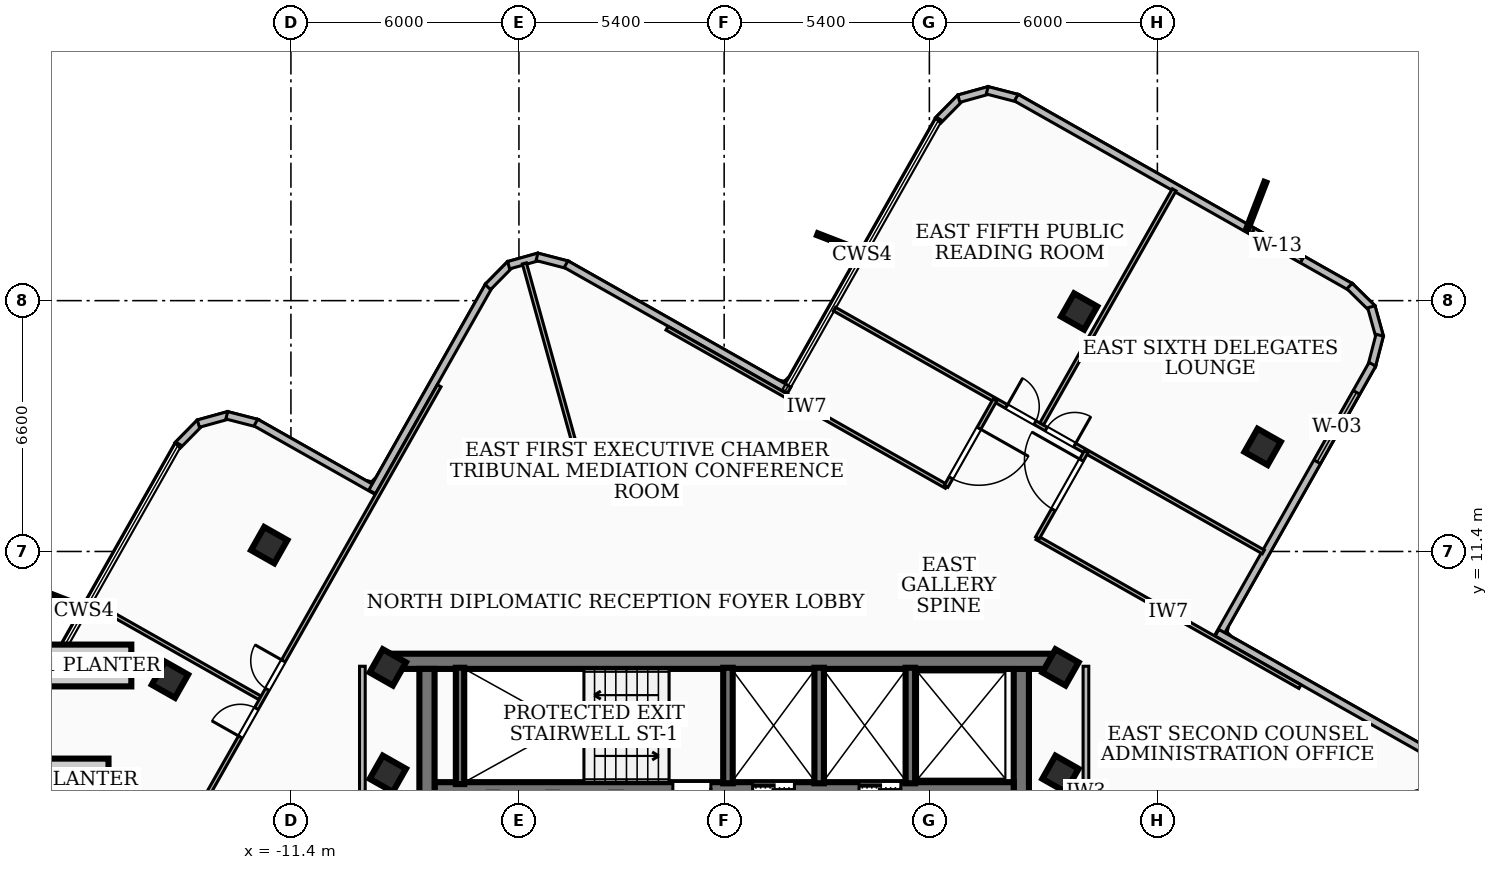
"""IFC4 building model, lengths in metres.
Left out: names, types, materials, properties, quantities, classifications, styles, units other than length and angle.
Written with IfcOpenShell. Run it as: python <this file> out.ifc"""

import sys

from ifc_helpers import new_model, si_unit, direction, frame, frame_2d, origin, origin_2d, place, context, subcontext, project, spatial, rectangle, extrude, element, fill, save


model = new_model("IFC4")
c1 = context("Model", 3, precision=1e-05, world=origin(), true_north=direction((0.0, 1.0)))
c2 = subcontext(c1, "Body", "Model", "MODEL_VIEW")
j1 = project(units=[si_unit("LENGTHUNIT", "METRE"), si_unit("PLANEANGLEUNIT", "RADIAN")], contexts=[c1])
p1 = place(None, origin())
s1 = spatial("IfcSite", under=j1, at=p1, CompositionType="ELEMENT")
p2 = place(p1, origin())
s2 = spatial("IfcBuilding", under=s1, at=p2, CompositionType="ELEMENT")
p3 = place(p2, frame((0.0, 0.0, 281.7)))
s3 = spatial("IfcBuildingStorey", under=s2, at=p3, CompositionType="ELEMENT", Elevation=281.7)
p4 = place(p3, frame((-8.78, 8.51, 0.0), z_axis=(0.0, 0.0, 1.0), x_axis=(1.0, 0.0, 0.0)))
e1 = element("IfcWall", 1, at=p4, inside=s3, PredefinedType="SHEAR", context=c2, shape_type="SweptSolid", body=[
    extrude(rectangle(XDim=17.56, YDim=0.4, at=frame_2d((8.78, 0.0))), origin(), (0.0, 0.0, 1.0), 3.12),
])
for number, where, z_axis, x_axis in (
    (2, (-7.82, 1.95, 0.0), (0.0, 0.0, 1.0), (0.0, 1.0, 0.0)),
    (3, (7.82, 8.31, 0.0), (0.0, 0.0, 1.0), (0.0, -1.0, 0.0)),
):
    element("IfcWall", number, at=place(p3, frame(where, z_axis=z_axis, x_axis=x_axis)), inside=s3, PredefinedType="SHEAR", context=c2, shape_type="SweptSolid", body=[
        extrude(rectangle(XDim=6.36, YDim=0.4, at=frame_2d((3.18, 0.0))), origin(), (0.0, 0.0, 1.0), 3.12),
    ])
p5 = place(p3, frame((7.62, 5.18, 0.0), z_axis=(0.0, 0.0, 1.0), x_axis=(-1.0, 0.0, 0.0)))
e4 = element("IfcWall", 4, at=p5, inside=s3, PredefinedType="SOLIDWALL", context=c2, shape_type="SweptSolid", body=[
    extrude(rectangle(XDim=15.24, YDim=0.3, at=frame_2d((7.62, 0.0))), origin(), (0.0, 0.0, 1.0), 3.12),
])
p6 = place(p5, frame((5.77, 0.0, 0.0)))
e5 = element("IfcOpeningElement", 5, at=p6, cuts=e4, PredefinedType="OPENING", context=c2, shape_type="SweptSolid", body=[
    extrude(rectangle(XDim=1.1, YDim=2.15, at=frame_2d((0.55, 1.075))), frame((0.0, 0.16, 0.0), z_axis=(0.0, -1.0, 0.0), x_axis=(1.0, 0.0, 0.0)), (0.0, 0.0, 1.0), 0.32),
])
p7 = place(p5, frame((2.97, 0.0, 0.0)))
e6 = element("IfcOpeningElement", 6, at=p7, cuts=e4, PredefinedType="OPENING", context=c2, shape_type="SweptSolid", body=[
    extrude(rectangle(XDim=1.1, YDim=2.15, at=frame_2d((0.55, 1.075))), frame((0.0, 0.16, 0.0), z_axis=(0.0, -1.0, 0.0), x_axis=(1.0, 0.0, 0.0)), (0.0, 0.0, 1.0), 0.32),
])
p8 = place(p5, frame((7.97, 0.0, 0.0)))
e7 = element("IfcOpeningElement", 7, at=p8, cuts=e4, PredefinedType="OPENING", context=c2, shape_type="SweptSolid", body=[
    extrude(rectangle(XDim=1.0, YDim=2.1, at=frame_2d((0.5, 1.05))), frame((0.0, 0.16, 0.0), z_axis=(0.0, -1.0, 0.0), x_axis=(1.0, 0.0, 0.0)), (0.0, 0.0, 1.0), 0.32),
])
p9 = place(p3, frame((-6.95, 5.28, 0.0), z_axis=(0.0, 0.0, 1.0), x_axis=(0.0, 1.0, 0.0)))
e8 = element("IfcWall", 8, at=p9, inside=s3, PredefinedType="SOLIDWALL", context=c2, shape_type="SweptSolid", body=[
    extrude(rectangle(XDim=3.06, YDim=0.22, at=frame_2d((1.53, 0.0))), origin(), (0.0, 0.0, 1.0), 3.12),
])
for number, where, z_axis, x_axis in (
    (9, (0.1, 5.3, 0.0), (0.0, 0.0, 1.0), (0.0, 1.0, 0.0)),
    (10, (2.5, 5.3, 0.0), (0.0, 0.0, 1.0), (0.0, 1.0, 0.0)),
    (11, (4.9, 5.3, 0.0), (0.0, 0.0, 1.0), (0.0, 1.0, 0.0)),
):
    element("IfcWall", number, at=place(p3, frame(where, z_axis=z_axis, x_axis=x_axis)), inside=s3, PredefinedType="SOLIDWALL", context=c2, shape_type="SweptSolid", body=[
        extrude(rectangle(XDim=3.04, YDim=0.25, at=frame_2d((1.52, 0.0))), origin(), (0.0, 0.0, 1.0), 3.12),
    ])
for number, where, z_axis, x_axis in (
    (12, (-8.85, 5.55, 0.0), (0.0, 0.0, 1.0), (0.493, 0.87, 0.0)),
    (13, (8.85, 5.55, 0.0), (0.0, 0.0, 1.0), (0.493, 0.87, 0.0)),
    (14, (-8.85, 8.35, 0.0), (0.0, 0.0, 1.0), (0.493, 0.87, 0.0)),
    (15, (8.85, 8.35, 0.0), (0.0, 0.0, 1.0), (0.493, 0.87, 0.0)),
    (16, (14.169, 14.152, 0.0), (0.0, 0.0, 1.0), (0.493, 0.87, 0.0)),
    (17, (9.341, 17.714, 0.0), (0.0, 0.0, 1.0), (0.493, 0.87, 0.0)),
    (18, (-11.971, 11.566, 0.0), (0.0, 0.0, 1.0), (0.493, 0.87, 0.0)),
    (19, (-14.583, 8.026, 0.0), (0.0, 0.0, 1.0), (0.493, 0.87, 0.0)),
):
    element("IfcColumn", number, at=place(p3, frame(where, z_axis=z_axis, x_axis=x_axis)), inside=s3, PredefinedType="COLUMN", context=c2, shape_type="SweptSolid", body=[
        extrude(rectangle(XDim=0.7, YDim=0.7, at=origin_2d()), origin(), (0.0, 0.0, 1.0), 3.42),
    ])
p10 = place(p3, frame((-14.382, 14.191, 0.0), z_axis=(0.0, 0.0, 1.0), x_axis=(0.701706468749, 0.712466161804, 0.0)))
e20 = element("IfcWall", 20, at=p10, inside=s3, PredefinedType="SOLIDWALL", context=c2, shape_type="SweptSolid", body=[
    extrude(rectangle(XDim=0.84, YDim=0.2, at=frame_2d((0.42, 0.0))), origin(), (0.0, 0.0, 1.0), 3.12),
])
p11 = place(p3, frame((-13.835, 14.764, 0.0), z_axis=(0.0, 0.0, 1.0), x_axis=(0.963780368541, 0.266697208862, 0.0)))
e21 = element("IfcWall", 21, at=p11, inside=s3, PredefinedType="SOLIDWALL", context=c2, shape_type="SweptSolid", body=[
    extrude(rectangle(XDim=0.825, YDim=0.2, at=frame_2d((0.412, 0.0))), origin(), (0.0, 0.0, 1.0), 3.12),
])
p12 = place(p3, frame((-13.088, 14.983, 0.0), z_axis=(0.0, 0.0, 1.0), x_axis=(0.968350107443, -0.249595812096, 0.0)))
e22 = element("IfcWall", 22, at=p12, inside=s3, PredefinedType="SOLIDWALL", context=c2, shape_type="SweptSolid", body=[
    extrude(rectangle(XDim=0.837, YDim=0.2, at=frame_2d((0.419, 0.0))), origin(), (0.0, 0.0, 1.0), 3.12),
])
p13 = place(p3, frame((-12.323, 14.792, 0.0), z_axis=(0.0, 0.0, 1.0), x_axis=(0.870412972764, -0.492322309918, 0.0)))
e23 = element("IfcWall", 23, at=p13, inside=s3, PredefinedType="SOLIDWALL", context=c2, shape_type="SweptSolid", body=[
    extrude(rectangle(XDim=3.642, YDim=0.2, at=frame_2d((1.821, 0.0))), origin(), (0.0, 0.0, 1.0), 3.12),
])
p14 = place(p3, frame((-9.262, 12.968, 0.0), z_axis=(0.0, 0.0, 1.0), x_axis=(0.492583125855, 0.87026539867, 0.0)))
e24 = element("IfcWall", 24, at=p14, inside=s3, PredefinedType="SOLIDWALL", context=c2, shape_type="SweptSolid", body=[
    extrude(rectangle(XDim=6.24, YDim=0.2, at=frame_2d((3.12, 0.0))), origin(), (0.0, 0.0, 1.0), 3.12),
])
p15 = place(p3, frame((-6.218, 18.359, 0.0), z_axis=(0.0, 0.0, 1.0), x_axis=(0.701706468749, 0.712466161804, 0.0)))
e25 = element("IfcWall", 25, at=p15, inside=s3, PredefinedType="SOLIDWALL", context=c2, shape_type="SweptSolid", body=[
    extrude(rectangle(XDim=0.84, YDim=0.2, at=frame_2d((0.42, 0.0))), origin(), (0.0, 0.0, 1.0), 3.12),
])
p16 = place(p3, frame((-5.671, 18.932, 0.0), z_axis=(0.0, 0.0, 1.0), x_axis=(0.963313924885, 0.268377126675, 0.0)))
e26 = element("IfcWall", 26, at=p16, inside=s3, PredefinedType="SOLIDWALL", context=c2, shape_type="SweptSolid", body=[
    extrude(rectangle(XDim=0.824, YDim=0.2, at=frame_2d((0.412, 0.0))), origin(), (0.0, 0.0, 1.0), 3.12),
])
p17 = place(p3, frame((-4.925, 19.152, 0.0), z_axis=(0.0, 0.0, 1.0), x_axis=(0.968015248239, -0.250891369276, 0.0)))
e27 = element("IfcWall", 27, at=p17, inside=s3, PredefinedType="SOLIDWALL", context=c2, shape_type="SweptSolid", body=[
    extrude(rectangle(XDim=0.838, YDim=0.2, at=frame_2d((0.419, 0.0))), origin(), (0.0, 0.0, 1.0), 3.12),
])
p18 = place(p3, frame((-4.16, 18.96, 0.0), z_axis=(0.0, 0.0, 1.0), x_axis=(0.870345588147, -0.492441425139, 0.0)))
e28 = element("IfcWall", 28, at=p18, inside=s3, PredefinedType="SOLIDWALL", context=c2, shape_type="SweptSolid", body=[
    extrude(rectangle(XDim=6.742, YDim=0.2, at=frame_2d((3.371, 0.0))), origin(), (0.0, 0.0, 1.0), 3.12),
])
p19 = place(p3, frame((5.629, 22.741, 0.0), z_axis=(0.0, 0.0, 1.0), x_axis=(0.701706468749, 0.712466161804, 0.0)))
e29 = element("IfcWall", 29, at=p19, inside=s3, PredefinedType="SOLIDWALL", context=c2, shape_type="SweptSolid", body=[
    extrude(rectangle(XDim=0.84, YDim=0.2, at=frame_2d((0.42, 0.0))), origin(), (0.0, 0.0, 1.0), 3.12),
])
p20 = place(p3, frame((6.176, 23.314, 0.0), z_axis=(0.0, 0.0, 1.0), x_axis=(0.963390474438, 0.268102207677, 0.0)))
e30 = element("IfcWall", 30, at=p20, inside=s3, PredefinedType="SOLIDWALL", context=c2, shape_type="SweptSolid", body=[
    extrude(rectangle(XDim=0.824, YDim=0.2, at=frame_2d((0.412, 0.0))), origin(), (0.0, 0.0, 1.0), 3.12),
])
p21 = place(p3, frame((6.922, 23.534, 0.0), z_axis=(0.0, 0.0, 1.0), x_axis=(0.968067673617, -0.250689009127, 0.0)))
e31 = element("IfcWall", 31, at=p21, inside=s3, PredefinedType="SOLIDWALL", context=c2, shape_type="SweptSolid", body=[
    extrude(rectangle(XDim=0.838, YDim=0.2, at=frame_2d((0.419, 0.0))), origin(), (0.0, 0.0, 1.0), 3.12),
])
p22 = place(p3, frame((7.687, 23.342, 0.0), z_axis=(0.0, 0.0, 1.0), x_axis=(0.870205552017, -0.49268884424, 0.0)))
e32 = element("IfcWall", 32, at=p22, inside=s3, PredefinedType="SOLIDWALL", context=c2, shape_type="SweptSolid", body=[
    extrude(rectangle(XDim=10.124, YDim=0.2, at=frame_2d((5.062, 0.0))), origin(), (0.0, 0.0, 1.0), 3.12),
])
p23 = place(p22, frame((7.147, 0.0, 0.85)))
e33 = element("IfcOpeningElement", 33, at=p23, cuts=e32, PredefinedType="OPENING", context=c2, shape_type="SweptSolid", body=[
    extrude(rectangle(XDim=1.5, YDim=1.8, at=frame_2d((0.75, 0.9))), frame((0.0, 0.11, 0.0), z_axis=(0.0, -1.0, 0.0), x_axis=(1.0, 0.0, 0.0)), (0.0, 0.0, 1.0), 0.22),
])
p24 = place(p3, frame((16.457, 18.384, 0.0), z_axis=(0.0, 0.0, 1.0), x_axis=(0.712904820367, -0.701260805334, 0.0)))
e34 = element("IfcWall", 34, at=p24, inside=s3, PredefinedType="SOLIDWALL", context=c2, shape_type="SweptSolid", body=[
    extrude(rectangle(XDim=0.839, YDim=0.2, at=frame_2d((0.419, 0.0))), origin(), (0.0, 0.0, 1.0), 3.12),
])
p25 = place(p3, frame((17.03, 17.838, 0.0), z_axis=(0.0, 0.0, 1.0), x_axis=(0.267796477586, -0.963475503888, 0.0)))
e35 = element("IfcWall", 35, at=p25, inside=s3, PredefinedType="SOLIDWALL", context=c2, shape_type="SweptSolid", body=[
    extrude(rectangle(XDim=0.825, YDim=0.2, at=frame_2d((0.413, 0.0))), origin(), (0.0, 0.0, 1.0), 3.12),
])
p26 = place(p3, frame((17.25, 17.091, 0.0), z_axis=(0.0, 0.0, 1.0), x_axis=(-0.250618286331, -0.968085985105, 0.0)))
e36 = element("IfcWall", 36, at=p26, inside=s3, PredefinedType="SOLIDWALL", context=c2, shape_type="SweptSolid", body=[
    extrude(rectangle(XDim=0.838, YDim=0.2, at=frame_2d((0.419, 0.0))), origin(), (0.0, 0.0, 1.0), 3.12),
])
p27 = place(p3, frame((17.058, 16.326, 0.0), z_axis=(0.0, 0.0, 1.0), x_axis=(-0.492504245901, -0.870310041175, 0.0)))
e37 = element("IfcWall", 37, at=p27, inside=s3, PredefinedType="SOLIDWALL", context=c2, shape_type="SweptSolid", body=[
    extrude(rectangle(XDim=8.242, YDim=0.2, at=frame_2d((4.121, 0.0))), origin(), (0.0, 0.0, 1.0), 3.12),
])
p28 = place(p27, frame((0.85, 0.0, 0.85)))
e38 = element("IfcOpeningElement", 38, at=p28, cuts=e37, PredefinedType="OPENING", context=c2, shape_type="SweptSolid", body=[
    extrude(rectangle(XDim=2.1, YDim=2.0, at=frame_2d((1.05, 1.0))), frame((0.0, 0.11, 0.0), z_axis=(0.0, -1.0, 0.0), x_axis=(1.0, 0.0, 0.0)), (0.0, 0.0, 1.0), 0.22),
])
p29 = place(p3, frame((12.968, 9.262, 0.0), z_axis=(0.0, 0.0, 1.0), x_axis=(0.87026539867, -0.492583125855, 0.0)))
e39 = element("IfcWall", 39, at=p29, inside=s3, PredefinedType="SOLIDWALL", context=c2, shape_type="SweptSolid", body=[
    extrude(rectangle(XDim=6.24, YDim=0.2, at=frame_2d((3.12, 0.0))), origin(), (0.0, 0.0, 1.0), 3.12),
])
p30 = place(p3, frame((-9.52, 1.75, 0.0), z_axis=(0.0, 0.0, 1.0), x_axis=(0.0, 1.0, 0.0)))
e40 = element("IfcWall", 40, at=p30, inside=s3, PredefinedType="PARTITIONING", context=c2, shape_type="SweptSolid", body=[
    extrude(rectangle(XDim=6.63, YDim=0.15, at=frame_2d((3.315, 0.0))), origin(), (0.0, 0.0, 1.0), 2.49),
])
p31 = place(p3, frame((9.52, 1.75, 0.0), z_axis=(0.0, 0.0, 1.0), x_axis=(0.0, 1.0, 0.0)))
e41 = element("IfcWall", 41, at=p31, inside=s3, PredefinedType="PARTITIONING", context=c2, shape_type="SweptSolid", body=[
    extrude(rectangle(XDim=6.63, YDim=0.15, at=frame_2d((3.315, 0.0))), origin(), (0.0, 0.0, 1.0), 3.12),
])
p32 = place(p3, frame((-3.75, 13.54, 0.0), z_axis=(0.0, 0.0, 1.0), x_axis=(-0.266822842302, 0.963745594452, 0.0)))
e42 = element("IfcWall", 42, at=p32, inside=s3, PredefinedType="PARTITIONING", context=c2, shape_type="SweptSolid", body=[
    extrude(rectangle(XDim=5.645, YDim=0.11, at=frame_2d((2.822, 0.0))), origin(), (0.0, 0.0, 1.0), 3.12),
])
p33 = place(p3, frame((11.3, 3.13, 0.0), z_axis=(0.0, 0.0, 1.0), x_axis=(0.963747113025, 0.26681735726, 0.0)))
e43 = element("IfcWall", 43, at=p33, inside=s3, PredefinedType="PARTITIONING", context=c2, shape_type="SweptSolid", body=[
    extrude(rectangle(XDim=7.969, YDim=0.11, at=frame_2d((3.984, 0.0))), origin(), (0.0, 0.0, 1.0), 3.12),
])
p34 = place(p3, frame((5.849, 13.11, 0.0), z_axis=(0.0, 0.0, 1.0), x_axis=(-0.870169207172, 0.49275303235, 0.0)))
e44 = element("IfcWall", 44, at=p34, inside=s3, PredefinedType="PARTITIONING", context=c2, shape_type="SweptSolid", body=[
    extrude(rectangle(XDim=8.45, YDim=0.11, at=frame_2d((4.225, 0.0))), origin(), (0.0, 0.0, 1.0), 3.12),
])
p35 = place(p3, frame((15.152, 7.843, 0.0), z_axis=(0.0, 0.0, 1.0), x_axis=(-0.87023152106, 0.492642973921, 0.0)))
e45 = element("IfcWall", 45, at=p35, inside=s3, PredefinedType="PARTITIONING", context=c2, shape_type="SweptSolid", body=[
    extrude(rectangle(XDim=7.951, YDim=0.11, at=frame_2d((3.976, 0.0))), origin(), (0.0, 0.0, 1.0), 2.49),
])
p36 = place(p3, frame((7.126, 15.386, 0.0), z_axis=(0.0, 0.0, 1.0), x_axis=(-0.492719860856, -0.870187990447, 0.0)))
e46 = element("IfcWall", 46, at=p36, inside=s3, PredefinedType="PARTITIONING", context=c2, shape_type="SweptSolid", body=[
    extrude(rectangle(XDim=2.61, YDim=0.11, at=frame_2d((1.305, 0.0))), origin(), (0.0, 0.0, 1.0), 3.12),
])
p37 = place(p36, frame((0.855, 0.0, 0.0)))
e47 = element("IfcOpeningElement", 47, at=p37, cuts=e46, PredefinedType="OPENING", context=c2, shape_type="SweptSolid", body=[
    extrude(rectangle(XDim=1.5, YDim=2.12, at=frame_2d((0.75, 1.06))), frame((0.0, 0.065, 0.0), z_axis=(0.0, -1.0, 0.0), x_axis=(1.0, 0.0, 0.0)), (0.0, 0.0, 1.0), 0.13),
])
p38 = place(p3, frame((8.242, 11.755, 0.0), z_axis=(0.0, 0.0, 1.0), x_axis=(0.492790693409, 0.870147879667, 0.0)))
e48 = element("IfcWall", 48, at=p38, inside=s3, PredefinedType="PARTITIONING", context=c2, shape_type="SweptSolid", body=[
    extrude(rectangle(XDim=2.61, YDim=0.11, at=frame_2d((1.305, 0.0))), origin(), (0.0, 0.0, 1.0), 2.49),
])
p39 = place(p38, frame((0.855, 0.0, 0.0)))
e49 = element("IfcOpeningElement", 49, at=p39, cuts=e48, PredefinedType="OPENING", context=c2, shape_type="SweptSolid", body=[
    extrude(rectangle(XDim=1.5, YDim=2.12, at=frame_2d((0.75, 1.06))), frame((0.0, 0.065, 0.0), z_axis=(0.0, -1.0, 0.0), x_axis=(1.0, 0.0, 0.0)), (0.0, 0.0, 1.0), 0.13),
])
p40 = place(p3, frame((8.357, 14.758, 0.0), z_axis=(0.0, 0.0, 1.0), x_axis=(0.492600685366, 0.870255459493, 0.0)))
e50 = element("IfcWall", 50, at=p40, inside=s3, PredefinedType="PARTITIONING", context=c2, shape_type="SweptSolid", body=[
    extrude(rectangle(XDim=7.075, YDim=0.11, at=frame_2d((3.538, 0.0))), origin(), (0.0, 0.0, 1.0), 2.49),
])
p41 = place(p3, frame((2.902, 17.778, 0.0), z_axis=(0.0, 0.0, 1.0), x_axis=(0.870194117035, -0.492709040588, 0.0)))
e51 = element("IfcWall", 51, at=p41, inside=s3, PredefinedType="PARTITIONING", context=c2, shape_type="SweptSolid", body=[
    extrude(rectangle(XDim=12.969, YDim=0.11, at=frame_2d((6.485, 0.0))), origin(), (0.0, 0.0, 1.0), 2.49),
])
p42 = place(p41, frame((6.405, 0.0, 0.0)))
e52 = element("IfcOpeningElement", 52, at=p42, cuts=e51, PredefinedType="OPENING", context=c2, shape_type="SweptSolid", body=[
    extrude(rectangle(XDim=0.86, YDim=2.04, at=frame_2d((0.43, 1.02))), frame((0.0, 0.065, 0.0), z_axis=(0.0, -1.0, 0.0), x_axis=(1.0, 0.0, 0.0)), (0.0, 0.0, 1.0), 0.13),
])
p43 = place(p41, frame((5.205, 0.0, 0.0)))
e53 = element("IfcOpeningElement", 53, at=p43, cuts=e51, PredefinedType="OPENING", context=c2, shape_type="SweptSolid", body=[
    extrude(rectangle(XDim=0.86, YDim=2.04, at=frame_2d((0.43, 1.02))), frame((0.0, 0.065, 0.0), z_axis=(0.0, -1.0, 0.0), x_axis=(1.0, 0.0, 0.0)), (0.0, 0.0, 1.0), 0.13),
])
p44 = place(p3, frame((-12.216, 7.549, 0.0), z_axis=(0.0, 0.0, 1.0), x_axis=(-0.870245204201, 0.492618802488, 0.0)))
e54 = element("IfcWall", 54, at=p44, inside=s3, PredefinedType="PARTITIONING", context=c2, shape_type="SweptSolid", body=[
    extrude(rectangle(XDim=5.085, YDim=0.11, at=frame_2d((2.542, 0.0))), origin(), (0.0, 0.0, 1.0), 2.49),
])
p45 = place(p3, frame((-17.619, -2.113, 0.0), z_axis=(0.0, 0.0, 1.0), x_axis=(0.492746831558, 0.870172718482, 0.0)))
e55 = element("IfcWall", 55, at=p45, inside=s3, PredefinedType="PARTITIONING", context=c2, shape_type="SweptSolid", body=[
    extrude(rectangle(XDim=20.54, YDim=0.11, at=frame_2d((10.27, 0.0))), origin(), (0.0, 0.0, 1.0), 2.49),
])
p46 = place(p45, frame((11.36, 0.0, 0.0)))
e56 = element("IfcOpeningElement", 56, at=p46, cuts=e55, PredefinedType="OPENING", context=c2, shape_type="SweptSolid", body=[
    extrude(rectangle(XDim=0.86, YDim=2.04, at=frame_2d((0.43, 1.02))), frame((0.0, 0.065, 0.0), z_axis=(0.0, -1.0, 0.0), x_axis=(1.0, 0.0, 0.0)), (0.0, 0.0, 1.0), 0.13),
])
p47 = place(p45, frame((9.92, 0.0, 0.0)))
e57 = element("IfcOpeningElement", 57, at=p47, cuts=e55, PredefinedType="OPENING", context=c2, shape_type="SweptSolid", body=[
    extrude(rectangle(XDim=0.86, YDim=2.04, at=frame_2d((0.43, 1.02))), frame((0.0, 0.065, 0.0), z_axis=(0.0, -1.0, 0.0), x_axis=(1.0, 0.0, 0.0)), (0.0, 0.0, 1.0), 0.13),
])
p48 = place(p23, origin())
e58 = element("IfcWindow", 58, at=p48, inside=s3, PartitioningType="SINGLE_PANEL", PredefinedType="WINDOW", context=c2, shape_type="SweptSolid", body=[
    extrude(rectangle(XDim=1.5, YDim=1.8, at=frame_2d((0.75, 0.9))), frame((0.0, 0.03, 0.0), z_axis=(0.0, -1.0, 0.0), x_axis=(1.0, 0.0, 0.0)), (0.0, 0.0, 1.0), 0.06),
])
fill(e33, e58)
p49 = place(p28, origin())
e59 = element("IfcWindow", 59, at=p49, inside=s3, PartitioningType="SINGLE_PANEL", PredefinedType="WINDOW", context=c2, shape_type="SweptSolid", body=[
    extrude(rectangle(XDim=2.1, YDim=2.0, at=frame_2d((1.05, 1.0))), frame((0.0, 0.03, 0.0), z_axis=(0.0, -1.0, 0.0), x_axis=(1.0, 0.0, 0.0)), (0.0, 0.0, 1.0), 0.06),
])
fill(e38, e59)
p50 = place(p6, origin())
e60 = element("IfcDoor", 60, at=p50, inside=s3, OperationType="DOUBLE_DOOR_SLIDING", PredefinedType="DOOR", context=c2, shape_type="SweptSolid", body=[
    extrude(rectangle(XDim=1.1, YDim=2.15, at=frame_2d((0.55, 1.075))), frame((0.0, 0.025, 0.0), z_axis=(0.0, -1.0, 0.0), x_axis=(1.0, 0.0, 0.0)), (0.0, 0.0, 1.0), 0.05),
])
fill(e5, e60)
p51 = place(p7, origin())
e61 = element("IfcDoor", 61, at=p51, inside=s3, OperationType="DOUBLE_DOOR_SLIDING", PredefinedType="DOOR", context=c2, shape_type="SweptSolid", body=[
    extrude(rectangle(XDim=1.1, YDim=2.15, at=frame_2d((0.55, 1.075))), frame((0.0, 0.025, 0.0), z_axis=(0.0, -1.0, 0.0), x_axis=(1.0, 0.0, 0.0)), (0.0, 0.0, 1.0), 0.05),
])
fill(e6, e61)
p52 = place(p8, origin())
e62 = element("IfcDoor", 62, at=p52, inside=s3, OperationType="SINGLE_SWING_LEFT", PredefinedType="DOOR", context=c2, shape_type="SweptSolid", body=[
    extrude(rectangle(XDim=1.0, YDim=2.1, at=frame_2d((0.5, 1.05))), frame((0.0, 0.025, 0.0), z_axis=(0.0, -1.0, 0.0), x_axis=(1.0, 0.0, 0.0)), (0.0, 0.0, 1.0), 0.05),
])
fill(e7, e62)
p53 = place(p37, origin())
e63 = element("IfcDoor", 63, at=p53, inside=s3, OperationType="SINGLE_SWING_LEFT", PredefinedType="DOOR", context=c2, shape_type="SweptSolid", body=[
    extrude(rectangle(XDim=1.5, YDim=2.12, at=frame_2d((0.75, 1.06))), frame((0.0, 0.025, 0.0), z_axis=(0.0, -1.0, 0.0), x_axis=(1.0, 0.0, 0.0)), (0.0, 0.0, 1.0), 0.05),
])
fill(e47, e63)
p54 = place(p39, origin())
e64 = element("IfcDoor", 64, at=p54, inside=s3, OperationType="SINGLE_SWING_RIGHT", PredefinedType="DOOR", context=c2, shape_type="SweptSolid", body=[
    extrude(rectangle(XDim=1.5, YDim=2.12, at=frame_2d((0.75, 1.06))), frame((0.0, 0.025, 0.0), z_axis=(0.0, -1.0, 0.0), x_axis=(1.0, 0.0, 0.0)), (0.0, 0.0, 1.0), 0.05),
])
fill(e49, e64)
p55 = place(p42, origin())
e65 = element("IfcDoor", 65, at=p55, inside=s3, OperationType="SINGLE_SWING_RIGHT", PredefinedType="DOOR", context=c2, shape_type="SweptSolid", body=[
    extrude(rectangle(XDim=0.86, YDim=2.04, at=frame_2d((0.43, 1.02))), frame((0.0, 0.025, 0.0), z_axis=(0.0, -1.0, 0.0), x_axis=(1.0, 0.0, 0.0)), (0.0, 0.0, 1.0), 0.05),
])
fill(e52, e65)
p56 = place(p43, origin())
e66 = element("IfcDoor", 66, at=p56, inside=s3, OperationType="SINGLE_SWING_LEFT", PredefinedType="DOOR", context=c2, shape_type="SweptSolid", body=[
    extrude(rectangle(XDim=0.86, YDim=2.04, at=frame_2d((0.43, 1.02))), frame((0.0, 0.025, 0.0), z_axis=(0.0, -1.0, 0.0), x_axis=(1.0, 0.0, 0.0)), (0.0, 0.0, 1.0), 0.05),
])
fill(e53, e66)
p57 = place(p46, origin())
e67 = element("IfcDoor", 67, at=p57, inside=s3, OperationType="SINGLE_SWING_RIGHT", PredefinedType="DOOR", context=c2, shape_type="SweptSolid", body=[
    extrude(rectangle(XDim=0.86, YDim=2.04, at=frame_2d((0.43, 1.02))), frame((0.0, 0.025, 0.0), z_axis=(0.0, -1.0, 0.0), x_axis=(1.0, 0.0, 0.0)), (0.0, 0.0, 1.0), 0.05),
])
fill(e56, e67)
p58 = place(p47, origin())
e68 = element("IfcDoor", 68, at=p58, inside=s3, OperationType="SINGLE_SWING_LEFT", PredefinedType="DOOR", context=c2, shape_type="SweptSolid", body=[
    extrude(rectangle(XDim=0.86, YDim=2.04, at=frame_2d((0.43, 1.02))), frame((0.0, 0.025, 0.0), z_axis=(0.0, -1.0, 0.0), x_axis=(1.0, 0.0, 0.0)), (0.0, 0.0, 1.0), 0.05),
])
fill(e57, e68)
save(model, sys.argv[1])
